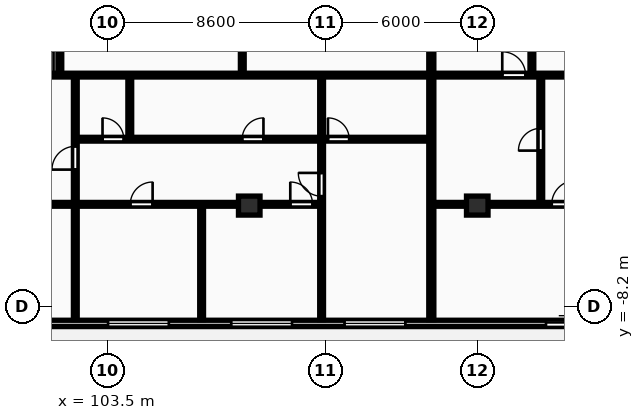
"""IFC4 building model, lengths in metres.
Left out: names, types, materials, properties, quantities, classifications, styles, units other than length and angle.
Written with IfcOpenShell. Run it as: python <this file> out.ifc"""

import sys

from ifc_helpers import new_model, si_unit, direction, frame, frame_2d, origin, origin_2d, place, context, subcontext, project, spatial, rectangle, extrude, element, fill, save


model = new_model("IFC4")
c1 = context("Model", 3, precision=1e-05, world=origin(), true_north=direction((0.0, 1.0)))
c2 = subcontext(c1, "Body", "Model", "MODEL_VIEW")
j1 = project(units=[si_unit("LENGTHUNIT", "METRE"), si_unit("PLANEANGLEUNIT", "RADIAN")], contexts=[c1])
p1 = place(None, origin())
s1 = spatial("IfcSite", under=j1, at=p1, CompositionType="ELEMENT")
p2 = place(p1, origin())
s2 = spatial("IfcBuilding", under=s1, at=p2, CompositionType="ELEMENT")
p3 = place(p2, frame((0.0, 0.0, 126.3)))
s3 = spatial("IfcBuildingStorey", under=s2, at=p3, CompositionType="ELEMENT", Elevation=126.3)
for number, where, z_axis, x_axis in (
    (1, (109.1, -4.2, 0.0), (0.0, 0.0, 1.0), (1.0, 0.0, 0.0)),
    (2, (118.1, -4.2, 0.0), (0.0, 0.0, 1.0), (1.0, 0.0, 0.0)),
):
    element("IfcColumn", number, at=place(p3, frame(where, z_axis=z_axis, x_axis=x_axis)), inside=s3, PredefinedType="COLUMN", context=c2, shape_type="SweptSolid", body=[
        extrude(rectangle(XDim=0.85, YDim=0.75, at=origin_2d()), origin(), (0.0, 0.0, 1.0), 3.25),
    ])
p4 = place(p3, frame((72.7, -8.85, 0.0), z_axis=(0.0, 0.0, 1.0), x_axis=(1.0, 0.0, 0.0)))
e3 = element("IfcWall", 3, at=p4, inside=s3, PredefinedType="STANDARD", context=c2, shape_type="SweptSolid", body=[
    extrude(rectangle(XDim=58.0, YDim=0.25, at=frame_2d((29.0, 0.0))), origin(), (0.0, 0.0, 1.0), 2.97),
])
p5 = place(p4, frame((5.77, 0.0, 0.85)))
e4 = element("IfcOpeningElement", 4, at=p5, cuts=e3, PredefinedType="OPENING", context=c2, shape_type="SweptSolid", body=[
    extrude(rectangle(XDim=2.4, YDim=1.9, at=frame_2d((1.2, 0.95))), frame((0.0, 0.135, 0.0), z_axis=(0.0, -1.0, 0.0), x_axis=(1.0, 0.0, 0.0)), (0.0, 0.0, 1.0), 0.27),
])
p6 = place(p4, frame((10.97, 0.0, 0.85)))
e5 = element("IfcOpeningElement", 5, at=p6, cuts=e3, PredefinedType="OPENING", context=c2, shape_type="SweptSolid", body=[
    extrude(rectangle(XDim=2.4, YDim=1.9, at=frame_2d((1.2, 0.95))), frame((0.0, 0.135, 0.0), z_axis=(0.0, -1.0, 0.0), x_axis=(1.0, 0.0, 0.0)), (0.0, 0.0, 1.0), 0.27),
])
p7 = place(p4, frame((16.387, 0.0, 0.85)))
e6 = element("IfcOpeningElement", 6, at=p7, cuts=e3, PredefinedType="OPENING", context=c2, shape_type="SweptSolid", body=[
    extrude(rectangle(XDim=2.4, YDim=1.9, at=frame_2d((1.2, 0.95))), frame((0.0, 0.135, 0.0), z_axis=(0.0, -1.0, 0.0), x_axis=(1.0, 0.0, 0.0)), (0.0, 0.0, 1.0), 0.27),
])
p8 = place(p4, frame((1.345, 0.0, 0.0)))
e7 = element("IfcOpeningElement", 7, at=p8, cuts=e3, PredefinedType="OPENING", context=c2, shape_type="SweptSolid", body=[
    extrude(rectangle(XDim=1.8, YDim=2.2, at=frame_2d((0.9, 1.1))), frame((0.0, 0.135, 0.0), z_axis=(0.0, -1.0, 0.0), x_axis=(1.0, 0.0, 0.0)), (0.0, 0.0, 1.0), 0.27),
])
p9 = place(p4, frame((21.419, 0.0, 0.85)))
e8 = element("IfcOpeningElement", 8, at=p9, cuts=e3, PredefinedType="OPENING", context=c2, shape_type="SweptSolid", body=[
    extrude(rectangle(XDim=2.4, YDim=1.9, at=frame_2d((1.2, 0.95))), frame((0.0, 0.135, 0.0), z_axis=(0.0, -1.0, 0.0), x_axis=(1.0, 0.0, 0.0)), (0.0, 0.0, 1.0), 0.27),
])
p10 = place(p4, frame((30.827, 0.0, 0.85)))
e9 = element("IfcOpeningElement", 9, at=p10, cuts=e3, PredefinedType="OPENING", context=c2, shape_type="SweptSolid", body=[
    extrude(rectangle(XDim=2.4, YDim=1.9, at=frame_2d((1.2, 0.95))), frame((0.0, 0.135, 0.0), z_axis=(0.0, -1.0, 0.0), x_axis=(1.0, 0.0, 0.0)), (0.0, 0.0, 1.0), 0.27),
])
p11 = place(p4, frame((35.688, 0.0, 0.85)))
e10 = element("IfcOpeningElement", 10, at=p11, cuts=e3, PredefinedType="OPENING", context=c2, shape_type="SweptSolid", body=[
    extrude(rectangle(XDim=2.4, YDim=1.9, at=frame_2d((1.2, 0.95))), frame((0.0, 0.135, 0.0), z_axis=(0.0, -1.0, 0.0), x_axis=(1.0, 0.0, 0.0)), (0.0, 0.0, 1.0), 0.27),
])
p12 = place(p4, frame((26.405, 0.0, 0.0)))
e11 = element("IfcOpeningElement", 11, at=p12, cuts=e3, PredefinedType="OPENING", context=c2, shape_type="SweptSolid", body=[
    extrude(rectangle(XDim=1.8, YDim=2.2, at=frame_2d((0.9, 1.1))), frame((0.0, 0.135, 0.0), z_axis=(0.0, -1.0, 0.0), x_axis=(1.0, 0.0, 0.0)), (0.0, 0.0, 1.0), 0.27),
])
p13 = place(p4, frame((40.161, 0.0, 0.85)))
e12 = element("IfcOpeningElement", 12, at=p13, cuts=e3, PredefinedType="OPENING", context=c2, shape_type="SweptSolid", body=[
    extrude(rectangle(XDim=2.4, YDim=1.9, at=frame_2d((1.2, 0.95))), frame((0.0, 0.135, 0.0), z_axis=(0.0, -1.0, 0.0), x_axis=(1.0, 0.0, 0.0)), (0.0, 0.0, 1.0), 0.27),
])
p14 = place(p4, frame((48.113, 0.0, 0.0)))
e13 = element("IfcOpeningElement", 13, at=p14, cuts=e3, PredefinedType="OPENING", context=c2, shape_type="SweptSolid", body=[
    extrude(rectangle(XDim=1.8, YDim=2.2, at=frame_2d((0.9, 1.1))), frame((0.0, 0.135, 0.0), z_axis=(0.0, -1.0, 0.0), x_axis=(1.0, 0.0, 0.0)), (0.0, 0.0, 1.0), 0.27),
])
p15 = place(p4, frame((54.9, 0.0, 0.85)))
e14 = element("IfcOpeningElement", 14, at=p15, cuts=e3, PredefinedType="OPENING", context=c2, shape_type="SweptSolid", body=[
    extrude(rectangle(XDim=2.4, YDim=1.9, at=frame_2d((1.2, 0.95))), frame((0.0, 0.135, 0.0), z_axis=(0.0, -1.0, 0.0), x_axis=(1.0, 0.0, 0.0)), (0.0, 0.0, 1.0), 0.27),
])
p16 = place(p3, frame((116.286, -8.7, 0.0), z_axis=(0.0, 0.0, 1.0), x_axis=(0.0, 1.0, 0.0)))
e15 = element("IfcWall", 15, at=p16, inside=s3, PredefinedType="PARTITIONING", context=c2, shape_type="SweptSolid", body=[
    extrude(rectangle(XDim=24.57, YDim=0.2, at=frame_2d((12.285, 0.0))), origin(), (0.0, 0.0, 1.0), 2.97),
])
p17 = place(p3, frame((108.825, 0.99, 0.0), z_axis=(0.0, 0.0, 1.0), x_axis=(0.0, 1.0, 0.0)))
e16 = element("IfcWall", 16, at=p17, inside=s3, PredefinedType="PARTITIONING", context=c2, shape_type="SweptSolid", body=[
    extrude(rectangle(XDim=14.9, YDim=0.15, at=frame_2d((7.45, 0.0))), origin(), (0.0, 0.0, 1.0), 2.97),
])
p18 = place(p17, frame((3.321, 0.0, 0.0)))
e17 = element("IfcOpeningElement", 17, at=p18, cuts=e16, PredefinedType="OPENING", context=c2, shape_type="SweptSolid", body=[
    extrude(rectangle(XDim=0.84, YDim=2.04, at=frame_2d((0.42, 1.02))), frame((0.0, 0.085, 0.0), z_axis=(0.0, -1.0, 0.0), x_axis=(1.0, 0.0, 0.0)), (0.0, 0.0, 1.0), 0.17),
])
p19 = place(p17, frame((7.88, 0.0, 0.0)))
e18 = element("IfcOpeningElement", 18, at=p19, cuts=e16, PredefinedType="OPENING", context=c2, shape_type="SweptSolid", body=[
    extrude(rectangle(XDim=0.88, YDim=2.06, at=frame_2d((0.44, 1.03))), frame((0.0, 0.085, 0.0), z_axis=(0.0, -1.0, 0.0), x_axis=(1.0, 0.0, 0.0)), (0.0, 0.0, 1.0), 0.17),
])
p20 = place(p3, frame((101.625, 0.99, 0.0), z_axis=(0.0, 0.0, 1.0), x_axis=(0.0, 1.0, 0.0)))
e19 = element("IfcWall", 19, at=p20, inside=s3, PredefinedType="PARTITIONING", context=c2, shape_type="SweptSolid", body=[
    extrude(rectangle(XDim=14.9, YDim=0.15, at=frame_2d((7.45, 0.0))), origin(), (0.0, 0.0, 1.0), 2.97),
])
p21 = place(p20, frame((3.302, 0.0, 0.0)))
e20 = element("IfcOpeningElement", 20, at=p21, cuts=e19, PredefinedType="OPENING", context=c2, shape_type="SweptSolid", body=[
    extrude(rectangle(XDim=0.88, YDim=2.06, at=frame_2d((0.44, 1.03))), frame((0.0, 0.085, 0.0), z_axis=(0.0, -1.0, 0.0), x_axis=(1.0, 0.0, 0.0)), (0.0, 0.0, 1.0), 0.17),
])
p22 = place(p3, frame((104.385, -1.56, 0.0), z_axis=(0.0, 0.0, 1.0), x_axis=(0.0, 1.0, 0.0)))
e21 = element("IfcWall", 21, at=p22, inside=s3, PredefinedType="PARTITIONING", context=c2, shape_type="SweptSolid", body=[
    extrude(rectangle(XDim=2.47, YDim=0.15, at=frame_2d((1.235, 0.0))), origin(), (0.0, 0.0, 1.0), 2.97),
])
p23 = place(p3, frame((107.22, -8.7, 0.0), z_axis=(0.0, 0.0, 1.0), x_axis=(0.0, 1.0, 0.0)))
e22 = element("IfcWall", 22, at=p23, inside=s3, PredefinedType="PARTITIONING", context=c2, shape_type="SweptSolid", body=[
    extrude(rectangle(XDim=4.47, YDim=0.15, at=frame_2d((2.235, 0.0))), origin(), (0.0, 0.0, 1.0), 2.97),
])
p24 = place(p3, frame((102.235, -8.7, 0.0), z_axis=(0.0, 0.0, 1.0), x_axis=(0.0, 1.0, 0.0)))
e23 = element("IfcWall", 23, at=p24, inside=s3, PredefinedType="PARTITIONING", context=c2, shape_type="SweptSolid", body=[
    extrude(rectangle(XDim=9.61, YDim=0.15, at=frame_2d((4.805, 0.0))), origin(), (0.0, 0.0, 1.0), 2.97),
])
p25 = place(p24, frame((5.92, 0.0, 0.0)))
e24 = element("IfcOpeningElement", 24, at=p25, cuts=e23, PredefinedType="OPENING", context=c2, shape_type="SweptSolid", body=[
    extrude(rectangle(XDim=0.92, YDim=2.08, at=frame_2d((0.46, 1.04))), frame((0.0, 0.085, 0.0), z_axis=(0.0, -1.0, 0.0), x_axis=(1.0, 0.0, 0.0)), (0.0, 0.0, 1.0), 0.17),
])
p26 = place(p3, frame((111.956, -1.56, 0.0), z_axis=(0.0, 0.0, 1.0), x_axis=(0.0, 1.0, 0.0)))
e25 = element("IfcWall", 25, at=p26, inside=s3, PredefinedType="PARTITIONING", context=c2, shape_type="SweptSolid", body=[
    extrude(rectangle(XDim=2.47, YDim=0.15, at=frame_2d((1.235, 0.0))), origin(), (0.0, 0.0, 1.0), 2.97),
])
p27 = place(p3, frame((111.956, -8.7, 0.0), z_axis=(0.0, 0.0, 1.0), x_axis=(0.0, 1.0, 0.0)))
e26 = element("IfcWall", 26, at=p27, inside=s3, PredefinedType="PARTITIONING", context=c2, shape_type="SweptSolid", body=[
    extrude(rectangle(XDim=7.1, YDim=0.15, at=frame_2d((3.55, 0.0))), origin(), (0.0, 0.0, 1.0), 2.97),
])
p28 = place(p27, frame((4.87, 0.0, 0.0)))
e27 = element("IfcOpeningElement", 27, at=p28, cuts=e26, PredefinedType="OPENING", context=c2, shape_type="SweptSolid", body=[
    extrude(rectangle(XDim=0.92, YDim=2.08, at=frame_2d((0.46, 1.04))), frame((0.0, 0.085, 0.0), z_axis=(0.0, -1.0, 0.0), x_axis=(1.0, 0.0, 0.0)), (0.0, 0.0, 1.0), 0.17),
])
p29 = place(p3, frame((102.274, -1.58, 0.0), z_axis=(0.0, 0.0, 1.0), x_axis=(1.0, 0.0, 0.0)))
e28 = element("IfcWall", 28, at=p29, inside=s3, PredefinedType="PARTITIONING", context=c2, shape_type="SweptSolid", body=[
    extrude(rectangle(XDim=13.932, YDim=0.15, at=frame_2d((6.966, 0.0))), origin(), (0.0, 0.0, 1.0), 2.97),
])
p30 = place(p29, frame((1.034, 0.0, 0.0)))
e29 = element("IfcOpeningElement", 29, at=p30, cuts=e28, PredefinedType="OPENING", context=c2, shape_type="SweptSolid", body=[
    extrude(rectangle(XDim=0.84, YDim=2.04, at=frame_2d((0.42, 1.02))), frame((0.0, 0.085, 0.0), z_axis=(0.0, -1.0, 0.0), x_axis=(1.0, 0.0, 0.0)), (0.0, 0.0, 1.0), 0.17),
])
p31 = place(p29, frame((6.546, 0.0, 0.0)))
e30 = element("IfcOpeningElement", 30, at=p31, cuts=e28, PredefinedType="OPENING", context=c2, shape_type="SweptSolid", body=[
    extrude(rectangle(XDim=0.84, YDim=2.04, at=frame_2d((0.42, 1.02))), frame((0.0, 0.085, 0.0), z_axis=(0.0, -1.0, 0.0), x_axis=(1.0, 0.0, 0.0)), (0.0, 0.0, 1.0), 0.17),
])
p32 = place(p29, frame((9.932, 0.0, 0.0)))
e31 = element("IfcOpeningElement", 31, at=p32, cuts=e28, PredefinedType="OPENING", context=c2, shape_type="SweptSolid", body=[
    extrude(rectangle(XDim=0.84, YDim=2.04, at=frame_2d((0.42, 1.02))), frame((0.0, 0.085, 0.0), z_axis=(0.0, -1.0, 0.0), x_axis=(1.0, 0.0, 0.0)), (0.0, 0.0, 1.0), 0.17),
])
p33 = place(p3, frame((97.735, 0.95, 0.0), z_axis=(0.0, 0.0, 1.0), x_axis=(1.0, 0.0, 0.0)))
e32 = element("IfcWall", 32, at=p33, inside=s3, PredefinedType="PARTITIONING", context=c2, shape_type="SweptSolid", body=[
    extrude(rectangle(XDim=18.472, YDim=0.15, at=frame_2d((9.236, 0.0))), origin(), (0.0, 0.0, 1.0), 2.97),
])
p34 = place(p33, frame((2.72, 0.0, 0.0)))
e33 = element("IfcOpeningElement", 33, at=p34, cuts=e32, PredefinedType="OPENING", context=c2, shape_type="SweptSolid", body=[
    extrude(rectangle(XDim=0.92, YDim=2.08, at=frame_2d((0.46, 1.04))), frame((0.0, 0.085, 0.0), z_axis=(0.0, -1.0, 0.0), x_axis=(1.0, 0.0, 0.0)), (0.0, 0.0, 1.0), 0.17),
])
p35 = place(p3, frame((97.735, -4.15, 0.0), z_axis=(0.0, 0.0, 1.0), x_axis=(1.0, 0.0, 0.0)))
e34 = element("IfcWall", 34, at=p35, inside=s3, PredefinedType="PARTITIONING", context=c2, shape_type="SweptSolid", body=[
    extrude(rectangle(XDim=14.222, YDim=0.15, at=frame_2d((7.111, 0.0))), origin(), (0.0, 0.0, 1.0), 2.663),
])
p36 = place(p35, frame((0.25, 0.0, 0.0)))
e35 = element("IfcOpeningElement", 35, at=p36, cuts=e34, PredefinedType="OPENING", context=c2, shape_type="SweptSolid", body=[
    extrude(rectangle(XDim=0.94, YDim=2.1, at=frame_2d((0.47, 1.05))), frame((0.0, 0.085, 0.0), z_axis=(0.0, -1.0, 0.0), x_axis=(1.0, 0.0, 0.0)), (0.0, 0.0, 1.0), 0.17),
])
p37 = place(p35, frame((6.671, 0.0, 0.0)))
e36 = element("IfcOpeningElement", 36, at=p37, cuts=e34, PredefinedType="OPENING", context=c2, shape_type="SweptSolid", body=[
    extrude(rectangle(XDim=0.88, YDim=2.06, at=frame_2d((0.44, 1.03))), frame((0.0, 0.085, 0.0), z_axis=(0.0, -1.0, 0.0), x_axis=(1.0, 0.0, 0.0)), (0.0, 0.0, 1.0), 0.17),
])
p38 = place(p35, frame((12.985, 0.0, 0.0)))
e37 = element("IfcOpeningElement", 37, at=p38, cuts=e34, PredefinedType="OPENING", context=c2, shape_type="SweptSolid", body=[
    extrude(rectangle(XDim=0.88, YDim=2.06, at=frame_2d((0.44, 1.03))), frame((0.0, 0.085, 0.0), z_axis=(0.0, -1.0, 0.0), x_axis=(1.0, 0.0, 0.0)), (0.0, 0.0, 1.0), 0.17),
])
p39 = place(p3, frame((120.256, 0.99, 0.0), z_axis=(0.0, 0.0, 1.0), x_axis=(0.0, 1.0, 0.0)))
e38 = element("IfcWall", 38, at=p39, inside=s3, PredefinedType="PARTITIONING", context=c2, shape_type="SweptSolid", body=[
    extrude(rectangle(XDim=14.9, YDim=0.15, at=frame_2d((7.45, 0.0))), origin(), (0.0, 0.0, 1.0), 2.97),
])
p40 = place(p39, frame((3.245, 0.0, 0.0)))
e39 = element("IfcOpeningElement", 39, at=p40, cuts=e38, PredefinedType="OPENING", context=c2, shape_type="SweptSolid", body=[
    extrude(rectangle(XDim=0.88, YDim=2.06, at=frame_2d((0.44, 1.03))), frame((0.0, 0.085, 0.0), z_axis=(0.0, -1.0, 0.0), x_axis=(1.0, 0.0, 0.0)), (0.0, 0.0, 1.0), 0.17),
])
p41 = place(p3, frame((120.606, -4.09, 0.0), z_axis=(0.0, 0.0, 1.0), x_axis=(0.0, 1.0, 0.0)))
e40 = element("IfcWall", 40, at=p41, inside=s3, PredefinedType="PARTITIONING", context=c2, shape_type="SweptSolid", body=[
    extrude(rectangle(XDim=5.0, YDim=0.15, at=frame_2d((2.5, 0.0))), origin(), (0.0, 0.0, 1.0), 2.97),
])
p42 = place(p41, frame((2.06, 0.0, 0.0)))
e41 = element("IfcOpeningElement", 41, at=p42, cuts=e40, PredefinedType="OPENING", context=c2, shape_type="SweptSolid", body=[
    extrude(rectangle(XDim=0.88, YDim=2.06, at=frame_2d((0.44, 1.03))), frame((0.0, 0.085, 0.0), z_axis=(0.0, -1.0, 0.0), x_axis=(1.0, 0.0, 0.0)), (0.0, 0.0, 1.0), 0.17),
])
p43 = place(p3, frame((116.366, 0.95, 0.0), z_axis=(0.0, 0.0, 1.0), x_axis=(1.0, 0.0, 0.0)))
e42 = element("IfcWall", 42, at=p43, inside=s3, PredefinedType="PARTITIONING", context=c2, shape_type="SweptSolid", body=[
    extrude(rectangle(XDim=14.254, YDim=0.15, at=frame_2d((7.127, 0.0))), origin(), (0.0, 0.0, 1.0), 2.97),
])
p44 = place(p43, frame((2.72, 0.0, 0.0)))
e43 = element("IfcOpeningElement", 43, at=p44, cuts=e42, PredefinedType="OPENING", context=c2, shape_type="SweptSolid", body=[
    extrude(rectangle(XDim=0.92, YDim=2.08, at=frame_2d((0.46, 1.04))), frame((0.0, 0.085, 0.0), z_axis=(0.0, -1.0, 0.0), x_axis=(1.0, 0.0, 0.0)), (0.0, 0.0, 1.0), 0.17),
])
p45 = place(p3, frame((116.366, -4.15, 0.0), z_axis=(0.0, 0.0, 1.0), x_axis=(1.0, 0.0, 0.0)))
e44 = element("IfcWall", 44, at=p45, inside=s3, PredefinedType="PARTITIONING", context=c2, shape_type="SweptSolid", body=[
    extrude(rectangle(XDim=14.254, YDim=0.15, at=frame_2d((7.127, 0.0))), origin(), (0.0, 0.0, 1.0), 2.663),
])
p46 = place(p45, frame((4.673, 0.0, 0.0)))
e45 = element("IfcOpeningElement", 45, at=p46, cuts=e44, PredefinedType="OPENING", context=c2, shape_type="SweptSolid", body=[
    extrude(rectangle(XDim=0.94, YDim=2.1, at=frame_2d((0.47, 1.05))), frame((0.0, 0.085, 0.0), z_axis=(0.0, -1.0, 0.0), x_axis=(1.0, 0.0, 0.0)), (0.0, 0.0, 1.0), 0.17),
])
p47 = place(p10, origin())
e46 = element("IfcWindow", 46, at=p47, inside=s3, PartitioningType="DOUBLE_PANEL_VERTICAL", PredefinedType="WINDOW", context=c2, shape_type="SweptSolid", body=[
    extrude(rectangle(XDim=2.4, YDim=1.9, at=frame_2d((1.2, 0.95))), frame((0.0, 0.03, 0.0), z_axis=(0.0, -1.0, 0.0), x_axis=(1.0, 0.0, 0.0)), (0.0, 0.0, 1.0), 0.06),
])
fill(e9, e46)
p48 = place(p11, origin())
e47 = element("IfcWindow", 47, at=p48, inside=s3, PartitioningType="DOUBLE_PANEL_VERTICAL", PredefinedType="WINDOW", context=c2, shape_type="SweptSolid", body=[
    extrude(rectangle(XDim=2.4, YDim=1.9, at=frame_2d((1.2, 0.95))), frame((0.0, 0.03, 0.0), z_axis=(0.0, -1.0, 0.0), x_axis=(1.0, 0.0, 0.0)), (0.0, 0.0, 1.0), 0.06),
])
fill(e10, e47)
p49 = place(p13, origin())
e48 = element("IfcWindow", 48, at=p49, inside=s3, PartitioningType="DOUBLE_PANEL_VERTICAL", PredefinedType="WINDOW", context=c2, shape_type="SweptSolid", body=[
    extrude(rectangle(XDim=2.4, YDim=1.9, at=frame_2d((1.2, 0.95))), frame((0.0, 0.03, 0.0), z_axis=(0.0, -1.0, 0.0), x_axis=(1.0, 0.0, 0.0)), (0.0, 0.0, 1.0), 0.06),
])
fill(e12, e48)
p50 = place(p14, origin())
e49 = element("IfcDoor", 49, at=p50, inside=s3, OperationType="SLIDING_TO_RIGHT", PredefinedType="DOOR", context=c2, shape_type="SweptSolid", body=[
    extrude(rectangle(XDim=1.8, YDim=2.2, at=frame_2d((0.9, 1.1))), frame((0.0, 0.025, 0.0), z_axis=(0.0, -1.0, 0.0), x_axis=(1.0, 0.0, 0.0)), (0.0, 0.0, 1.0), 0.05),
])
fill(e13, e49)
p51 = place(p25, origin())
e50 = element("IfcDoor", 50, at=p51, inside=s3, OperationType="SINGLE_SWING_LEFT", PredefinedType="DOOR", context=c2, shape_type="SweptSolid", body=[
    extrude(rectangle(XDim=0.92, YDim=2.08, at=frame_2d((0.46, 1.04))), frame((0.0, 0.025, 0.0), z_axis=(0.0, -1.0, 0.0), x_axis=(1.0, 0.0, 0.0)), (0.0, 0.0, 1.0), 0.05),
])
fill(e24, e50)
p52 = place(p28, origin())
e51 = element("IfcDoor", 51, at=p52, inside=s3, OperationType="SINGLE_SWING_RIGHT", PredefinedType="DOOR", context=c2, shape_type="SweptSolid", body=[
    extrude(rectangle(XDim=0.92, YDim=2.08, at=frame_2d((0.46, 1.04))), frame((0.0, 0.025, 0.0), z_axis=(0.0, -1.0, 0.0), x_axis=(1.0, 0.0, 0.0)), (0.0, 0.0, 1.0), 0.05),
])
fill(e27, e51)
p53 = place(p30, origin())
e52 = element("IfcDoor", 52, at=p53, inside=s3, OperationType="SINGLE_SWING_LEFT", PredefinedType="DOOR", context=c2, shape_type="SweptSolid", body=[
    extrude(rectangle(XDim=0.84, YDim=2.04, at=frame_2d((0.42, 1.02))), frame((0.0, 0.025, 0.0), z_axis=(0.0, -1.0, 0.0), x_axis=(1.0, 0.0, 0.0)), (0.0, 0.0, 1.0), 0.05),
])
fill(e29, e52)
p54 = place(p31, origin())
e53 = element("IfcDoor", 53, at=p54, inside=s3, OperationType="SINGLE_SWING_RIGHT", PredefinedType="DOOR", context=c2, shape_type="SweptSolid", body=[
    extrude(rectangle(XDim=0.84, YDim=2.04, at=frame_2d((0.42, 1.02))), frame((0.0, 0.025, 0.0), z_axis=(0.0, -1.0, 0.0), x_axis=(1.0, 0.0, 0.0)), (0.0, 0.0, 1.0), 0.05),
])
fill(e30, e53)
p55 = place(p32, origin())
e54 = element("IfcDoor", 54, at=p55, inside=s3, OperationType="SINGLE_SWING_LEFT", PredefinedType="DOOR", context=c2, shape_type="SweptSolid", body=[
    extrude(rectangle(XDim=0.84, YDim=2.04, at=frame_2d((0.42, 1.02))), frame((0.0, 0.025, 0.0), z_axis=(0.0, -1.0, 0.0), x_axis=(1.0, 0.0, 0.0)), (0.0, 0.0, 1.0), 0.05),
])
fill(e31, e54)
p56 = place(p34, origin())
e55 = element("IfcDoor", 55, at=p56, inside=s3, OperationType="SINGLE_SWING_RIGHT", PredefinedType="DOOR", context=c2, shape_type="SweptSolid", body=[
    extrude(rectangle(XDim=0.92, YDim=2.08, at=frame_2d((0.46, 1.04))), frame((0.0, 0.025, 0.0), z_axis=(0.0, -1.0, 0.0), x_axis=(1.0, 0.0, 0.0)), (0.0, 0.0, 1.0), 0.05),
])
fill(e33, e55)
p57 = place(p37, origin())
e56 = element("IfcDoor", 56, at=p57, inside=s3, OperationType="SINGLE_SWING_RIGHT", PredefinedType="DOOR", context=c2, shape_type="SweptSolid", body=[
    extrude(rectangle(XDim=0.88, YDim=2.06, at=frame_2d((0.44, 1.03))), frame((0.0, 0.025, 0.0), z_axis=(0.0, -1.0, 0.0), x_axis=(1.0, 0.0, 0.0)), (0.0, 0.0, 1.0), 0.05),
])
fill(e36, e56)
p58 = place(p38, origin())
e57 = element("IfcDoor", 57, at=p58, inside=s3, OperationType="SINGLE_SWING_LEFT", PredefinedType="DOOR", context=c2, shape_type="SweptSolid", body=[
    extrude(rectangle(XDim=0.88, YDim=2.06, at=frame_2d((0.44, 1.03))), frame((0.0, 0.025, 0.0), z_axis=(0.0, -1.0, 0.0), x_axis=(1.0, 0.0, 0.0)), (0.0, 0.0, 1.0), 0.05),
])
fill(e37, e57)
p59 = place(p42, origin())
e58 = element("IfcDoor", 58, at=p59, inside=s3, OperationType="SINGLE_SWING_LEFT", PredefinedType="DOOR", context=c2, shape_type="SweptSolid", body=[
    extrude(rectangle(XDim=0.88, YDim=2.06, at=frame_2d((0.44, 1.03))), frame((0.0, 0.025, 0.0), z_axis=(0.0, -1.0, 0.0), x_axis=(1.0, 0.0, 0.0)), (0.0, 0.0, 1.0), 0.05),
])
fill(e41, e58)
p60 = place(p44, origin())
e59 = element("IfcDoor", 59, at=p60, inside=s3, OperationType="SINGLE_SWING_LEFT", PredefinedType="DOOR", context=c2, shape_type="SweptSolid", body=[
    extrude(rectangle(XDim=0.92, YDim=2.08, at=frame_2d((0.46, 1.04))), frame((0.0, 0.025, 0.0), z_axis=(0.0, -1.0, 0.0), x_axis=(1.0, 0.0, 0.0)), (0.0, 0.0, 1.0), 0.05),
])
fill(e43, e59)
p61 = place(p46, origin())
e60 = element("IfcDoor", 60, at=p61, inside=s3, OperationType="SINGLE_SWING_RIGHT", PredefinedType="DOOR", context=c2, shape_type="SweptSolid", body=[
    extrude(rectangle(XDim=0.94, YDim=2.1, at=frame_2d((0.47, 1.05))), frame((0.0, 0.025, 0.0), z_axis=(0.0, -1.0, 0.0), x_axis=(1.0, 0.0, 0.0)), (0.0, 0.0, 1.0), 0.05),
])
fill(e45, e60)
save(model, sys.argv[1])
